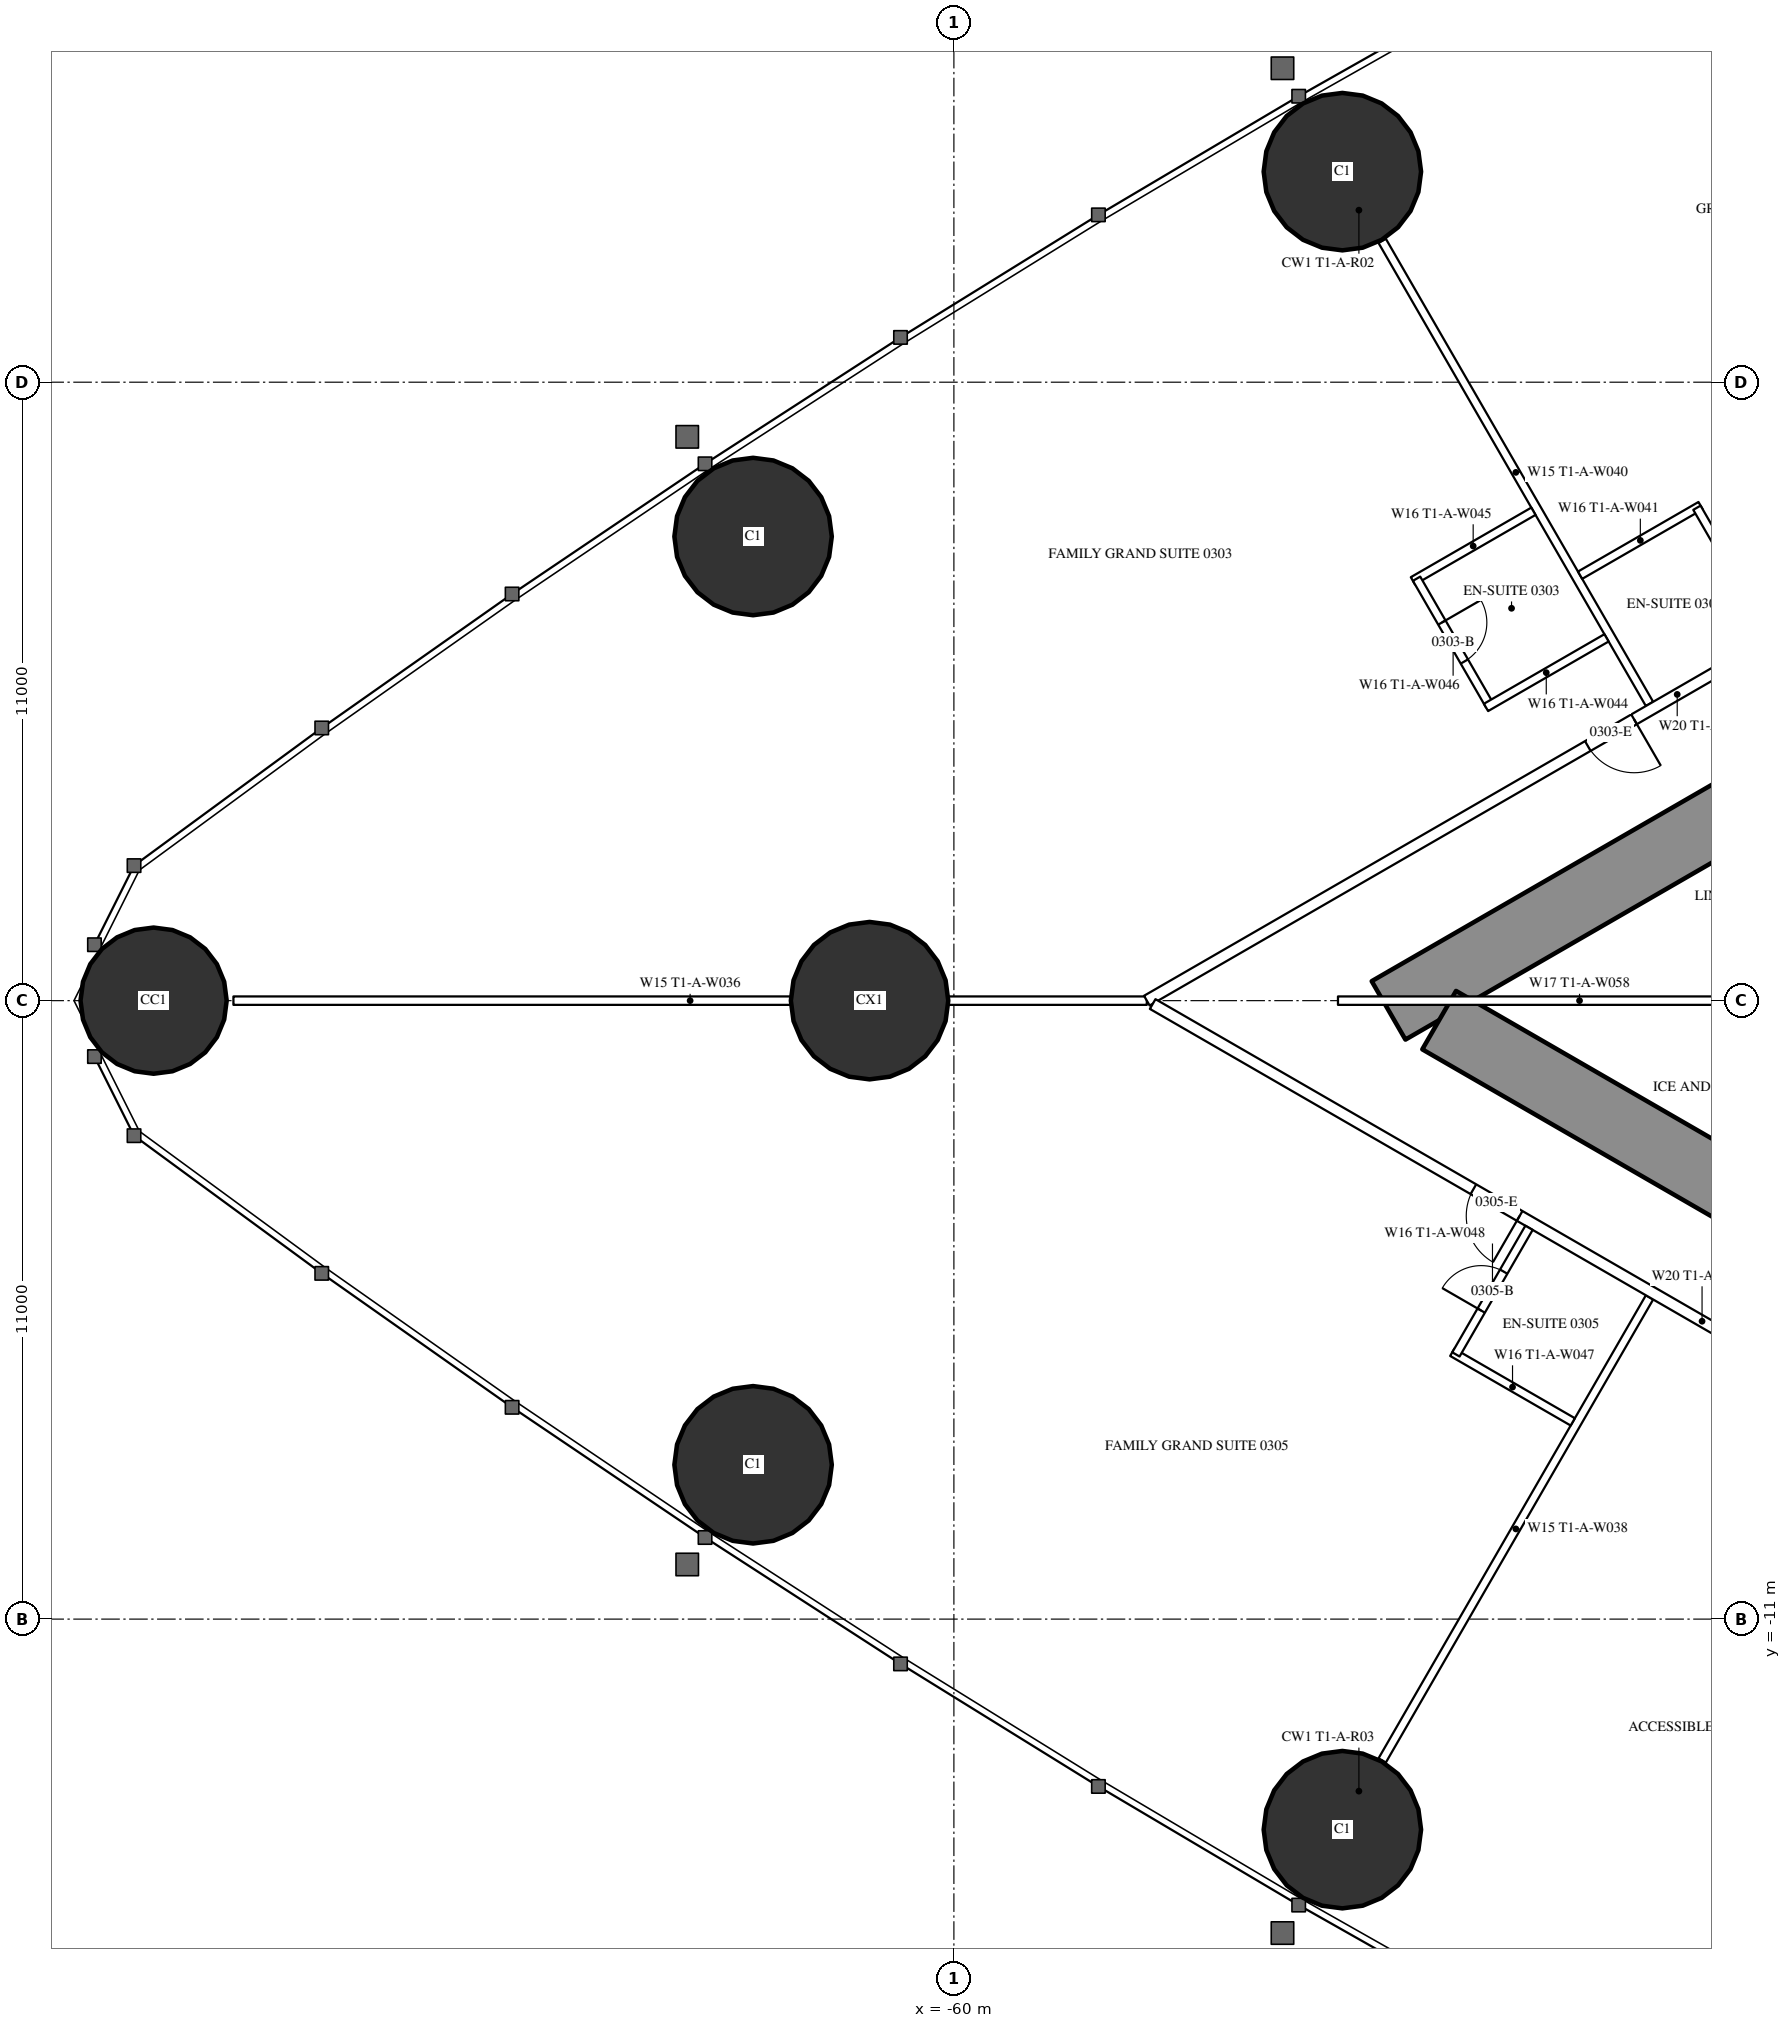
"""IFC4 building model, lengths in metres.
Left out: names, types, materials, properties, quantities, classifications, styles, units other than length and angle.
Written with IfcOpenShell. Run it as: python <this file> out.ifc"""

import sys

from ifc_helpers import new_model, si_unit, direction, frame, frame_2d, origin, origin_2d, place, context, subcontext, project, spatial, rectangle, hollow_circle, extrude, element, fill, save


model = new_model("IFC4")
c1 = context("Model", 3, precision=1e-05, world=origin(), true_north=direction((0.0, 1.0)))
c2 = subcontext(c1, "Body", "Model", "MODEL_VIEW")
j1 = project(units=[si_unit("LENGTHUNIT", "METRE"), si_unit("PLANEANGLEUNIT", "RADIAN")], contexts=[c1])
p1 = place(None, origin())
s1 = spatial("IfcSite", under=j1, at=p1, CompositionType="ELEMENT")
p2 = place(p1, origin())
s2 = spatial("IfcBuilding", under=s1, at=p2, CompositionType="ELEMENT")
p3 = place(p2, frame((0.0, 0.0, 18.0)))
s3 = spatial("IfcBuildingStorey", under=s2, at=p3, CompositionType="ELEMENT", Elevation=18.0)
p4 = place(p3, frame((-74.235, 0.0, 0.0), z_axis=(0.0, 0.0, 1.0), x_axis=(1.0, 0.0, 0.0)))
e1 = element("IfcColumn", 1, at=p4, inside=s3, PredefinedType="COLUMN", context=c2, shape_type="SweptSolid", body=[
    extrude(hollow_circle(Radius=1.3, WallThickness=0.1, at=origin_2d()), origin(), (0.0, 0.0, 1.0), 3.5),
])
for number, where, z_axis, x_axis in (
    (2, (-63.572, -8.255, 0.0), (0.0, 0.0, 1.0), (1.0, 0.0, 0.0)),
    (3, (-53.09, -14.745, 0.0), (0.0, 0.0, 1.0), (1.0, 0.0, 0.0)),
    (4, (-53.09, 14.745, 0.0), (0.0, 0.0, 1.0), (1.0, 0.0, 0.0)),
    (5, (-63.572, 8.255, 0.0), (0.0, 0.0, 1.0), (1.0, 0.0, 0.0)),
):
    element("IfcColumn", number, at=place(p3, frame(where, z_axis=z_axis, x_axis=x_axis)), inside=s3, PredefinedType="COLUMN", context=c2, shape_type="SweptSolid", body=[
        extrude(hollow_circle(Radius=1.4, WallThickness=0.12, at=origin_2d()), origin(), (0.0, 0.0, 1.0), 3.5),
    ])
p5 = place(p3, frame((-61.5, 0.0, 0.0), z_axis=(0.0, 0.0, 1.0), x_axis=(1.0, 0.0, 0.0)))
e6 = element("IfcColumn", 6, at=p5, inside=s3, PredefinedType="COLUMN", context=c2, shape_type="SweptSolid", body=[
    extrude(hollow_circle(Radius=1.4, WallThickness=0.1, at=origin_2d()), origin(), (0.0, 0.0, 1.0), 3.5),
])
p6 = place(p3, frame((-27.2, 14.3, 0.0), z_axis=(0.0, 0.0, 1.0), x_axis=(-0.866026593062, -0.499997940104, 0.0)))
e7 = element("IfcWall", 7, at=p6, inside=s3, PredefinedType="SHEAR", context=c2, shape_type="SweptSolid", body=[
    extrude(rectangle(XDim=28.946, YDim=1.2, at=frame_2d((14.473, 0.0))), origin(), (0.0, 0.0, 1.0), 3.5),
])
p7 = place(p6, frame((4.6, 0.0, 0.0)))
e8 = element("IfcOpeningElement", 8, at=p7, cuts=e7, PredefinedType="OPENING", context=c2, shape_type="SweptSolid", body=[
    extrude(rectangle(XDim=1.0, YDim=2.2, at=frame_2d((0.5, 1.1))), frame((0.0, 0.61, 0.0), z_axis=(0.0, -1.0, 0.0), x_axis=(1.0, 0.0, 0.0)), (0.0, 0.0, 1.0), 1.22),
])
p8 = place(p6, frame((13.395, 0.0, 0.0)))
e9 = element("IfcOpeningElement", 9, at=p8, cuts=e7, PredefinedType="OPENING", context=c2, shape_type="SweptSolid", body=[
    extrude(rectangle(XDim=1.8, YDim=2.2, at=frame_2d((0.9, 1.1))), frame((0.0, 0.61, 0.0), z_axis=(0.0, -1.0, 0.0), x_axis=(1.0, 0.0, 0.0)), (0.0, 0.0, 1.0), 1.22),
])
p9 = place(p3, frame((-27.2, -14.3, 0.0), z_axis=(0.0, 0.0, 1.0), x_axis=(-0.866024021859, 0.500002393557, 0.0)))
e10 = element("IfcWall", 10, at=p9, inside=s3, PredefinedType="SHEAR", context=c2, shape_type="SweptSolid", body=[
    extrude(rectangle(XDim=27.907, YDim=1.2, at=frame_2d((13.954, 0.0))), origin(), (0.0, 0.0, 1.0), 3.5),
])
p10 = place(p9, frame((4.6, 0.0, 0.0)))
e11 = element("IfcOpeningElement", 11, at=p10, cuts=e10, PredefinedType="OPENING", context=c2, shape_type="SweptSolid", body=[
    extrude(rectangle(XDim=1.0, YDim=2.2, at=frame_2d((0.5, 1.1))), frame((0.0, 0.61, 0.0), z_axis=(0.0, -1.0, 0.0), x_axis=(1.0, 0.0, 0.0)), (0.0, 0.0, 1.0), 1.22),
])
p11 = place(p9, frame((13.395, 0.0, 0.0)))
e12 = element("IfcOpeningElement", 12, at=p11, cuts=e10, PredefinedType="OPENING", context=c2, shape_type="SweptSolid", body=[
    extrude(rectangle(XDim=1.8, YDim=2.2, at=frame_2d((0.9, 1.1))), frame((0.0, 0.61, 0.0), z_axis=(0.0, -1.0, 0.0), x_axis=(1.0, 0.0, 0.0)), (0.0, 0.0, 1.0), 1.22),
])
for number, where, z_axis, x_axis in (
    (13, (-47.627, 5.278, 0.0), (0.0, 0.0, 1.0), (-0.5, 0.866, 0.0)),
    (14, (-47.627, -5.278, 0.0), (0.0, 0.0, 1.0), (-0.5, -0.866, 0.0)),
):
    element("IfcWall", number, at=place(p3, frame(where, z_axis=z_axis, x_axis=x_axis)), inside=s3, PredefinedType="PARTITIONING", context=c2, shape_type="SweptSolid", body=[
        extrude(rectangle(XDim=9.51, YDim=0.15, at=frame_2d((4.755, 0.0))), origin(), (0.0, 0.0, 1.0), 2.25),
    ])
p12 = place(p3, frame((-56.568, 0.0, 0.0), z_axis=(0.0, 0.0, 1.0), x_axis=(-1.0, 0.0, 0.0)))
e15 = element("IfcWall", 15, at=p12, inside=s3, PredefinedType="PARTITIONING", context=c2, shape_type="SweptSolid", body=[
    extrude(rectangle(XDim=16.247, YDim=0.15, at=frame_2d((8.124, 0.0))), origin(), (0.0, 0.0, 1.0), 2.25),
])
p13 = place(p3, frame((-37.7, 10.894, 0.0), z_axis=(0.0, 0.0, 1.0), x_axis=(-0.866027905338, -0.499995667157, 0.0)))
e16 = element("IfcWall", 16, at=p13, inside=s3, PredefinedType="PARTITIONING", context=c2, shape_type="SweptSolid", body=[
    extrude(rectangle(XDim=21.787, YDim=0.2, at=frame_2d((10.894, 0.0))), origin(), (0.0, 0.0, 1.0), 3.25),
])
p14 = place(p13, frame((11.78, 0.0, 0.0)))
e17 = element("IfcOpeningElement", 17, at=p14, cuts=e16, PredefinedType="OPENING", context=c2, shape_type="SweptSolid", body=[
    extrude(rectangle(XDim=0.95, YDim=2.2, at=frame_2d((0.475, 1.1))), frame((0.0, 0.11, 0.0), z_axis=(0.0, -1.0, 0.0), x_axis=(1.0, 0.0, 0.0)), (0.0, 0.0, 1.0), 0.22),
])
p15 = place(p13, frame((7.73, 0.0, 0.0)))
e18 = element("IfcOpeningElement", 18, at=p15, cuts=e16, PredefinedType="OPENING", context=c2, shape_type="SweptSolid", body=[
    extrude(rectangle(XDim=0.95, YDim=2.2, at=frame_2d((0.475, 1.1))), frame((0.0, 0.11, 0.0), z_axis=(0.0, -1.0, 0.0), x_axis=(1.0, 0.0, 0.0)), (0.0, 0.0, 1.0), 0.22),
])
p16 = place(p3, frame((-36.92, -11.344, 0.0), z_axis=(0.0, 0.0, 1.0), x_axis=(-0.866028313256, 0.499994960614, 0.0)))
e19 = element("IfcWall", 19, at=p16, inside=s3, PredefinedType="PARTITIONING", context=c2, shape_type="SweptSolid", body=[
    extrude(rectangle(XDim=22.568, YDim=0.2, at=frame_2d((11.284, 0.0))), origin(), (0.0, 0.0, 1.0), 3.25),
])
p17 = place(p16, frame((15.03, 0.0, 0.0)))
e20 = element("IfcOpeningElement", 20, at=p17, cuts=e19, PredefinedType="OPENING", context=c2, shape_type="SweptSolid", body=[
    extrude(rectangle(XDim=0.95, YDim=2.2, at=frame_2d((0.475, 1.1))), frame((0.0, 0.11, 0.0), z_axis=(0.0, -1.0, 0.0), x_axis=(1.0, 0.0, 0.0)), (0.0, 0.0, 1.0), 0.22),
])
p18 = place(p16, frame((3.35, 0.0, 0.0)))
e21 = element("IfcOpeningElement", 21, at=p18, cuts=e19, PredefinedType="OPENING", context=c2, shape_type="SweptSolid", body=[
    extrude(rectangle(XDim=1.0, YDim=2.2, at=frame_2d((0.5, 1.1))), frame((0.0, 0.11, 0.0), z_axis=(0.0, -1.0, 0.0), x_axis=(1.0, 0.0, 0.0)), (0.0, 0.0, 1.0), 0.22),
])
p19 = place(p3, frame((-49.692, 8.704, 0.0), z_axis=(0.0, 0.0, 1.0), x_axis=(-0.866073894602, -0.499916002032, 0.0)))
e22 = element("IfcWall", 22, at=p19, inside=s3, PredefinedType="PARTITIONING", context=c2, shape_type="SweptSolid", body=[
    extrude(rectangle(XDim=2.475, YDim=0.15, at=frame_2d((1.238, 0.0))), origin(), (0.0, 0.0, 1.0), 3.25),
])
p20 = place(p3, frame((-50.47, 5.253, 0.0), z_axis=(0.0, 0.0, 1.0), x_axis=(-0.500006934395, 0.866021400173, 0.0)))
e23 = element("IfcWall", 23, at=p20, inside=s3, PredefinedType="PARTITIONING", context=c2, shape_type="SweptSolid", body=[
    extrude(rectangle(XDim=2.6, YDim=0.15, at=frame_2d((1.3, 0.0))), origin(), (0.0, 0.0, 1.0), 3.25),
])
p21 = place(p20, frame((0.9, 0.0, 0.0)))
e24 = element("IfcOpeningElement", 24, at=p21, cuts=e23, PredefinedType="OPENING", context=c2, shape_type="SweptSolid", body=[
    extrude(rectangle(XDim=0.8, YDim=2.2, at=frame_2d((0.4, 1.1))), frame((0.0, 0.085, 0.0), z_axis=(0.0, -1.0, 0.0), x_axis=(1.0, 0.0, 0.0)), (0.0, 0.0, 1.0), 0.17),
])
p22 = place(p3, frame((-48.392, 6.453, 0.0), z_axis=(0.0, 0.0, 1.0), x_axis=(-0.86604923931, -0.499958713387, 0.0)))
e25 = element("IfcWall", 25, at=p22, inside=s3, PredefinedType="PARTITIONING", context=c2, shape_type="SweptSolid", body=[
    extrude(rectangle(XDim=2.475, YDim=0.15, at=frame_2d((1.237, 0.0))), origin(), (0.0, 0.0, 1.0), 3.25),
])
p23 = place(p3, frame((-48.992, -7.492, 0.0), z_axis=(0.0, 0.0, 1.0), x_axis=(-0.866031185235, 0.4999899861, 0.0)))
e26 = element("IfcWall", 26, at=p23, inside=s3, PredefinedType="PARTITIONING", context=c2, shape_type="SweptSolid", body=[
    extrude(rectangle(XDim=2.475, YDim=0.15, at=frame_2d((1.238, 0.0))), origin(), (0.0, 0.0, 1.0), 3.25),
])
p24 = place(p3, frame((-49.77, -4.04, 0.0), z_axis=(0.0, 0.0, 1.0), x_axis=(-0.500006934395, -0.866021400173, 0.0)))
e27 = element("IfcWall", 27, at=p24, inside=s3, PredefinedType="PARTITIONING", context=c2, shape_type="SweptSolid", body=[
    extrude(rectangle(XDim=2.6, YDim=0.15, at=frame_2d((1.3, 0.0))), origin(), (0.0, 0.0, 1.0), 3.25),
])
p25 = place(p24, frame((0.9, 0.0, 0.0)))
e28 = element("IfcOpeningElement", 28, at=p25, cuts=e27, PredefinedType="OPENING", context=c2, shape_type="SweptSolid", body=[
    extrude(rectangle(XDim=0.8, YDim=2.2, at=frame_2d((0.4, 1.1))), frame((0.0, 0.085, 0.0), z_axis=(0.0, -1.0, 0.0), x_axis=(1.0, 0.0, 0.0)), (0.0, 0.0, 1.0), 0.17),
])
p26 = place(p3, frame((-46.719, 8.804, 0.0), z_axis=(0.0, 0.0, 1.0), x_axis=(-0.866006523861, -0.500032699561, 0.0)))
e29 = element("IfcWall", 29, at=p26, inside=s3, PredefinedType="PARTITIONING", context=c2, shape_type="SweptSolid", body=[
    extrude(rectangle(XDim=2.475, YDim=0.15, at=frame_2d((1.237, 0.0))), origin(), (0.0, 0.0, 1.0), 3.25),
])
p27 = place(p3, frame((-45.483, 6.515, 0.0), z_axis=(0.0, 0.0, 1.0), x_axis=(-0.500006934395, 0.866021400173, 0.0)))
e30 = element("IfcWall", 30, at=p27, inside=s3, PredefinedType="PARTITIONING", context=c2, shape_type="SweptSolid", body=[
    extrude(rectangle(XDim=2.6, YDim=0.15, at=frame_2d((1.3, 0.0))), origin(), (0.0, 0.0, 1.0), 3.25),
])
p28 = place(p27, frame((0.9, 0.0, 0.0)))
e31 = element("IfcOpeningElement", 31, at=p28, cuts=e30, PredefinedType="OPENING", context=c2, shape_type="SweptSolid", body=[
    extrude(rectangle(XDim=0.8, YDim=2.2, at=frame_2d((0.4, 1.1))), frame((0.0, 0.085, 0.0), z_axis=(0.0, -1.0, 0.0), x_axis=(1.0, 0.0, 0.0)), (0.0, 0.0, 1.0), 0.17),
])
p29 = place(p3, frame((-44.575, 0.0, 0.0), z_axis=(0.0, 0.0, 1.0), x_axis=(-1.0, 0.0, 0.0)))
e32 = element("IfcWall", 32, at=p29, inside=s3, PredefinedType="PARTITIONING", context=c2, shape_type="SweptSolid", body=[
    extrude(rectangle(XDim=8.593, YDim=0.15, at=frame_2d((4.297, 0.0))), origin(), (0.0, 0.0, 1.0), 2.25),
])
p30 = place(p21, origin())
e33 = element("IfcDoor", 33, at=p30, inside=s3, OperationType="SINGLE_SWING_RIGHT", PredefinedType="DOOR", context=c2, shape_type="SweptSolid", body=[
    extrude(rectangle(XDim=0.8, YDim=2.2, at=frame_2d((0.4, 1.1))), frame((0.0, 0.025, 0.0), z_axis=(0.0, -1.0, 0.0), x_axis=(1.0, 0.0, 0.0)), (0.0, 0.0, 1.0), 0.05),
])
fill(e24, e33)
p31 = place(p14, origin())
e34 = element("IfcDoor", 34, at=p31, inside=s3, OperationType="SINGLE_SWING_LEFT", PredefinedType="DOOR", context=c2, shape_type="SweptSolid", body=[
    extrude(rectangle(XDim=0.95, YDim=2.2, at=frame_2d((0.475, 1.1))), frame((0.0, 0.025, 0.0), z_axis=(0.0, -1.0, 0.0), x_axis=(1.0, 0.0, 0.0)), (0.0, 0.0, 1.0), 0.05),
])
fill(e17, e34)
p32 = place(p25, origin())
e35 = element("IfcDoor", 35, at=p32, inside=s3, OperationType="SINGLE_SWING_RIGHT", PredefinedType="DOOR", context=c2, shape_type="SweptSolid", body=[
    extrude(rectangle(XDim=0.8, YDim=2.2, at=frame_2d((0.4, 1.1))), frame((0.0, 0.025, 0.0), z_axis=(0.0, -1.0, 0.0), x_axis=(1.0, 0.0, 0.0)), (0.0, 0.0, 1.0), 0.05),
])
fill(e28, e35)
p33 = place(p17, origin())
e36 = element("IfcDoor", 36, at=p33, inside=s3, OperationType="SINGLE_SWING_LEFT", PredefinedType="DOOR", context=c2, shape_type="SweptSolid", body=[
    extrude(rectangle(XDim=0.95, YDim=2.2, at=frame_2d((0.475, 1.1))), frame((0.0, 0.025, 0.0), z_axis=(0.0, -1.0, 0.0), x_axis=(1.0, 0.0, 0.0)), (0.0, 0.0, 1.0), 0.05),
])
fill(e20, e36)
save(model, sys.argv[1])
